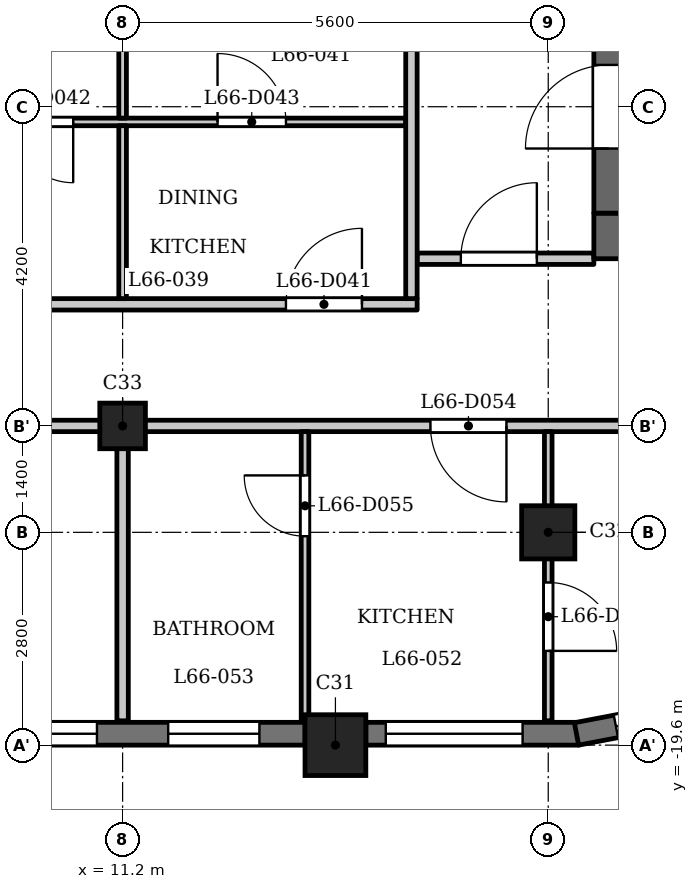
"""IFC4 building model, lengths in metres.
Left out: names, types, materials, properties, quantities, classifications, styles, units other than length and angle.
Written with IfcOpenShell. Run it as: python <this file> out.ifc"""

import sys

from ifc_helpers import new_model, si_unit, direction, frame, frame_2d, origin, origin_2d, place, context, subcontext, project, spatial, rectangle, extrude, element, fill, save


model = new_model("IFC4")
c1 = context("Model", 3, precision=1e-05, world=origin(), true_north=direction((0.0, 1.0)))
c2 = subcontext(c1, "Body", "Model", "MODEL_VIEW")
j1 = project(units=[si_unit("LENGTHUNIT", "METRE"), si_unit("PLANEANGLEUNIT", "RADIAN")], contexts=[c1])
p1 = place(None, origin())
s1 = spatial("IfcSite", under=j1, at=p1, CompositionType="ELEMENT")
p2 = place(p1, origin())
s2 = spatial("IfcBuilding", under=s1, at=p2, CompositionType="ELEMENT")
p3 = place(p2, frame((0.0, 0.0, 255.7)))
s3 = spatial("IfcBuildingStorey", under=s2, at=p3, CompositionType="ELEMENT", Elevation=255.7)
p4 = place(p3, frame((14.0, -19.6, 0.0), z_axis=(0.0, 0.0, 1.0), x_axis=(1.0, 0.0, 0.0)))
e1 = element("IfcColumn", 1, at=p4, inside=s3, PredefinedType="COLUMN", context=c2, shape_type="SweptSolid", body=[
    extrude(rectangle(XDim=0.8, YDim=0.8, at=origin_2d()), origin(), (0.0, 0.0, 1.0), 3.5),
])
p5 = place(p3, frame((16.8, -16.8, 0.0), z_axis=(0.0, 0.0, 1.0), x_axis=(1.0, 0.0, 0.0)))
e2 = element("IfcColumn", 2, at=p5, inside=s3, PredefinedType="COLUMN", context=c2, shape_type="SweptSolid", body=[
    extrude(rectangle(XDim=0.7, YDim=0.7, at=origin_2d()), origin(), (0.0, 0.0, 1.0), 3.5),
])
p6 = place(p3, frame((11.2, -15.4, 0.0), z_axis=(0.0, 0.0, 1.0), x_axis=(1.0, 0.0, 0.0)))
e3 = element("IfcColumn", 3, at=p6, inside=s3, PredefinedType="COLUMN", context=c2, shape_type="SweptSolid", body=[
    extrude(rectangle(XDim=0.6, YDim=0.6, at=origin_2d()), origin(), (0.0, 0.0, 1.0), 3.5),
])
p7 = place(p3, frame((8.8, -19.45, 0.0), z_axis=(0.0, 0.0, 1.0), x_axis=(1.0, 0.0, 0.0)))
e4 = element("IfcWall", 4, at=p7, inside=s3, PredefinedType="SOLIDWALL", context=c2, shape_type="SweptSolid", body=[
    extrude(rectangle(XDim=4.8, YDim=0.3, at=frame_2d((2.4, 0.0))), origin(), (0.0, 0.0, 1.0), 2.55),
])
p8 = place(p7, frame((0.262, 0.0, 0.9)))
e5 = element("IfcOpeningElement", 5, at=p8, cuts=e4, PredefinedType="OPENING", context=c2, shape_type="SweptSolid", body=[
    extrude(rectangle(XDim=1.8, YDim=1.25, at=frame_2d((0.9, 0.625))), frame((0.0, 0.16, 0.0), z_axis=(0.0, -1.0, 0.0), x_axis=(1.0, 0.0, 0.0)), (0.0, 0.0, 1.0), 0.32),
])
p9 = place(p7, frame((3.0, 0.0, 0.6)))
e6 = element("IfcOpeningElement", 6, at=p9, cuts=e4, PredefinedType="OPENING", context=c2, shape_type="SweptSolid", body=[
    extrude(rectangle(XDim=1.2, YDim=1.55, at=frame_2d((0.6, 0.775))), frame((0.0, 0.16, 0.0), z_axis=(0.0, -1.0, 0.0), x_axis=(1.0, 0.0, 0.0)), (0.0, 0.0, 1.0), 0.32),
])
p10 = place(p3, frame((14.4, -19.45, 0.0), z_axis=(0.0, 0.0, 1.0), x_axis=(1.0, 0.0, 0.0)))
e7 = element("IfcWall", 7, at=p10, inside=s3, PredefinedType="SOLIDWALL", context=c2, shape_type="SweptSolid", body=[
    extrude(rectangle(XDim=2.8, YDim=0.3, at=frame_2d((1.4, 0.0))), origin(), (0.0, 0.0, 1.0), 2.55),
])
p11 = place(p10, frame((0.262, 0.0, 0.9)))
e8 = element("IfcOpeningElement", 8, at=p11, cuts=e7, PredefinedType="OPENING", context=c2, shape_type="SweptSolid", body=[
    extrude(rectangle(XDim=1.8, YDim=1.25, at=frame_2d((0.9, 0.625))), frame((0.0, 0.16, 0.0), z_axis=(0.0, -1.0, 0.0), x_axis=(1.0, 0.0, 0.0)), (0.0, 0.0, 1.0), 0.32),
])
p12 = place(p3, frame((17.172, -19.453, 0.0), z_axis=(0.0, 0.0, 1.0), x_axis=(0.982301706131, 0.187305520826, 0.0)))
e9 = element("IfcWall", 9, at=p12, inside=s3, PredefinedType="SOLIDWALL", context=c2, shape_type="SweptSolid", body=[
    extrude(rectangle(XDim=1.856, YDim=0.3, at=frame_2d((0.928, 0.0))), origin(), (0.0, 0.0, 1.0), 2.55),
])
p13 = place(p12, frame((0.528, 0.0, 0.6)))
e10 = element("IfcOpeningElement", 10, at=p13, cuts=e9, PredefinedType="OPENING", context=c2, shape_type="SweptSolid", body=[
    extrude(rectangle(XDim=0.8, YDim=1.55, at=frame_2d((0.4, 0.775))), frame((0.0, 0.16, 0.0), z_axis=(0.0, -1.0, 0.0), x_axis=(1.0, 0.0, 0.0)), (0.0, 0.0, 1.0), 0.32),
])
p14 = place(p3, frame((17.4, -12.9, 0.0), z_axis=(0.0, 0.0, 1.0), x_axis=(1.0, 0.0, 0.0)))
e11 = element("IfcWall", 11, at=p14, inside=s3, PredefinedType="SHEAR", context=c2, shape_type="SweptSolid", body=[
    extrude(rectangle(XDim=7.32, YDim=0.6, at=frame_2d((3.66, 0.0))), origin(), (0.0, 0.0, 1.0), 3.2),
])
p15 = place(p3, frame((17.6, -12.6, 0.0), z_axis=(0.0, 0.0, 1.0), x_axis=(0.0, 1.0, 0.0)))
e12 = element("IfcWall", 12, at=p15, inside=s3, PredefinedType="SHEAR", context=c2, shape_type="SweptSolid", body=[
    extrude(rectangle(XDim=25.2, YDim=0.4, at=frame_2d((12.6, 0.0))), origin(), (0.0, 0.0, 1.0), 3.2),
])
p16 = place(p15, frame((6.3, 0.0, 0.0)))
e13 = element("IfcOpeningElement", 13, at=p16, cuts=e12, PredefinedType="OPENING", context=c2, shape_type="SweptSolid", body=[
    extrude(rectangle(XDim=1.1, YDim=2.1, at=frame_2d((0.55, 1.05))), frame((0.0, 0.21, 0.0), z_axis=(0.0, -1.0, 0.0), x_axis=(1.0, 0.0, 0.0)), (0.0, 0.0, 1.0), 0.42),
])
p17 = place(p15, frame((8.7, 0.0, 0.0)))
e14 = element("IfcOpeningElement", 14, at=p17, cuts=e12, PredefinedType="OPENING", context=c2, shape_type="SweptSolid", body=[
    extrude(rectangle(XDim=1.1, YDim=2.1, at=frame_2d((0.55, 1.05))), frame((0.0, 0.21, 0.0), z_axis=(0.0, -1.0, 0.0), x_axis=(1.0, 0.0, 0.0)), (0.0, 0.0, 1.0), 0.42),
])
p18 = place(p15, frame((11.2, 0.0, 0.0)))
e15 = element("IfcOpeningElement", 15, at=p18, cuts=e12, PredefinedType="OPENING", context=c2, shape_type="SweptSolid", body=[
    extrude(rectangle(XDim=0.9, YDim=2.1, at=frame_2d((0.45, 1.05))), frame((0.0, 0.21, 0.0), z_axis=(0.0, -1.0, 0.0), x_axis=(1.0, 0.0, 0.0)), (0.0, 0.0, 1.0), 0.42),
])
p19 = place(p15, frame((17.05, 0.0, 0.0)))
e16 = element("IfcOpeningElement", 16, at=p19, cuts=e12, PredefinedType="OPENING", context=c2, shape_type="SweptSolid", body=[
    extrude(rectangle(XDim=0.9, YDim=2.1, at=frame_2d((0.45, 1.05))), frame((0.0, 0.21, 0.0), z_axis=(0.0, -1.0, 0.0), x_axis=(1.0, 0.0, 0.0)), (0.0, 0.0, 1.0), 0.42),
])
p20 = place(p15, frame((23.25, 0.0, 0.0)))
e17 = element("IfcOpeningElement", 17, at=p20, cuts=e12, PredefinedType="OPENING", context=c2, shape_type="SweptSolid", body=[
    extrude(rectangle(XDim=1.1, YDim=2.1, at=frame_2d((0.55, 1.05))), frame((0.0, 0.21, 0.0), z_axis=(0.0, -1.0, 0.0), x_axis=(1.0, 0.0, 0.0)), (0.0, 0.0, 1.0), 0.42),
])
p21 = place(p15, frame((0.85, 0.0, 0.0)))
e18 = element("IfcOpeningElement", 18, at=p21, cuts=e12, PredefinedType="OPENING", context=c2, shape_type="SweptSolid", body=[
    extrude(rectangle(XDim=1.1, YDim=2.1, at=frame_2d((0.55, 1.05))), frame((0.0, 0.21, 0.0), z_axis=(0.0, -1.0, 0.0), x_axis=(1.0, 0.0, 0.0)), (0.0, 0.0, 1.0), 0.42),
])
p22 = place(p15, frame((13.075, 0.0, 0.0)))
e19 = element("IfcOpeningElement", 19, at=p22, cuts=e12, PredefinedType="OPENING", context=c2, shape_type="SweptSolid", body=[
    extrude(rectangle(XDim=1.8, YDim=2.1, at=frame_2d((0.9, 1.05))), frame((0.0, 0.21, 0.0), z_axis=(0.0, -1.0, 0.0), x_axis=(1.0, 0.0, 0.0)), (0.0, 0.0, 1.0), 0.42),
])
p23 = place(p3, frame((-23.322, -15.4, 0.0), z_axis=(0.0, 0.0, 1.0), x_axis=(1.0, 0.0, 0.0)))
e20 = element("IfcWall", 20, at=p23, inside=s3, PredefinedType="PARTITIONING", context=c2, shape_type="SweptSolid", body=[
    extrude(rectangle(XDim=46.872, YDim=0.15, at=frame_2d((23.436, 0.0))), origin(), (0.0, 0.0, 1.0), 3.2),
])
p24 = place(p23, frame((7.172, 0.0, 0.0)))
e21 = element("IfcOpeningElement", 21, at=p24, cuts=e20, PredefinedType="OPENING", context=c2, shape_type="SweptSolid", body=[
    extrude(rectangle(XDim=1.0, YDim=2.1, at=frame_2d((0.5, 1.05))), frame((0.0, 0.085, 0.0), z_axis=(0.0, -1.0, 0.0), x_axis=(1.0, 0.0, 0.0)), (0.0, 0.0, 1.0), 0.17),
])
p25 = place(p23, frame((14.922, 0.0, 0.0)))
e22 = element("IfcOpeningElement", 22, at=p25, cuts=e20, PredefinedType="OPENING", context=c2, shape_type="SweptSolid", body=[
    extrude(rectangle(XDim=1.0, YDim=2.1, at=frame_2d((0.5, 1.05))), frame((0.0, 0.085, 0.0), z_axis=(0.0, -1.0, 0.0), x_axis=(1.0, 0.0, 0.0)), (0.0, 0.0, 1.0), 0.17),
])
p26 = place(p23, frame((26.372, 0.0, 0.0)))
e23 = element("IfcOpeningElement", 23, at=p26, cuts=e20, PredefinedType="OPENING", context=c2, shape_type="SweptSolid", body=[
    extrude(rectangle(XDim=1.0, YDim=2.1, at=frame_2d((0.5, 1.05))), frame((0.0, 0.085, 0.0), z_axis=(0.0, -1.0, 0.0), x_axis=(1.0, 0.0, 0.0)), (0.0, 0.0, 1.0), 0.17),
])
p27 = place(p23, frame((38.572, 0.0, 0.0)))
e24 = element("IfcOpeningElement", 24, at=p27, cuts=e20, PredefinedType="OPENING", context=c2, shape_type="SweptSolid", body=[
    extrude(rectangle(XDim=1.0, YDim=2.1, at=frame_2d((0.5, 1.05))), frame((0.0, 0.085, 0.0), z_axis=(0.0, -1.0, 0.0), x_axis=(1.0, 0.0, 0.0)), (0.0, 0.0, 1.0), 0.17),
])
p28 = place(p3, frame((-15.075, -13.8, 0.0), z_axis=(0.0, 0.0, 1.0), x_axis=(1.0, 0.0, 0.0)))
e25 = element("IfcWall", 25, at=p28, inside=s3, PredefinedType="PARTITIONING", context=c2, shape_type="SweptSolid", body=[
    extrude(rectangle(XDim=30.15, YDim=0.15, at=frame_2d((15.075, 0.0))), origin(), (0.0, 0.0, 1.0), 3.2),
])
p29 = place(p28, frame((7.825, 0.0, 0.0)))
e26 = element("IfcOpeningElement", 26, at=p29, cuts=e25, PredefinedType="OPENING", context=c2, shape_type="SweptSolid", body=[
    extrude(rectangle(XDim=1.0, YDim=2.1, at=frame_2d((0.5, 1.05))), frame((0.0, 0.085, 0.0), z_axis=(0.0, -1.0, 0.0), x_axis=(1.0, 0.0, 0.0)), (0.0, 0.0, 1.0), 0.17),
])
p30 = place(p28, frame((11.225, 0.0, 0.0)))
e27 = element("IfcOpeningElement", 27, at=p30, cuts=e25, PredefinedType="OPENING", context=c2, shape_type="SweptSolid", body=[
    extrude(rectangle(XDim=1.0, YDim=2.1, at=frame_2d((0.5, 1.05))), frame((0.0, 0.085, 0.0), z_axis=(0.0, -1.0, 0.0), x_axis=(1.0, 0.0, 0.0)), (0.0, 0.0, 1.0), 0.17),
])
p31 = place(p28, frame((15.575, 0.0, 0.0)))
e28 = element("IfcOpeningElement", 28, at=p31, cuts=e25, PredefinedType="OPENING", context=c2, shape_type="SweptSolid", body=[
    extrude(rectangle(XDim=1.0, YDim=2.1, at=frame_2d((0.5, 1.05))), frame((0.0, 0.085, 0.0), z_axis=(0.0, -1.0, 0.0), x_axis=(1.0, 0.0, 0.0)), (0.0, 0.0, 1.0), 0.17),
])
p32 = place(p28, frame((28.424, 0.0, 0.0)))
e29 = element("IfcOpeningElement", 29, at=p32, cuts=e25, PredefinedType="OPENING", context=c2, shape_type="SweptSolid", body=[
    extrude(rectangle(XDim=1.0, YDim=2.1, at=frame_2d((0.5, 1.05))), frame((0.0, 0.085, 0.0), z_axis=(0.0, -1.0, 0.0), x_axis=(1.0, 0.0, 0.0)), (0.0, 0.0, 1.0), 0.17),
])
p33 = place(p3, frame((15.075, -13.2, 0.0), z_axis=(0.0, 0.0, 1.0), x_axis=(1.0, 0.0, 0.0)))
e30 = element("IfcWall", 30, at=p33, inside=s3, PredefinedType="PARTITIONING", context=c2, shape_type="SweptSolid", body=[
    extrude(rectangle(XDim=2.325, YDim=0.15, at=frame_2d((1.163, 0.0))), origin(), (0.0, 0.0, 1.0), 3.2),
])
p34 = place(p33, frame((0.575, 0.0, 0.0)))
e31 = element("IfcOpeningElement", 31, at=p34, cuts=e30, PredefinedType="OPENING", context=c2, shape_type="SweptSolid", body=[
    extrude(rectangle(XDim=1.0, YDim=2.1, at=frame_2d((0.5, 1.05))), frame((0.0, 0.085, 0.0), z_axis=(0.0, -1.0, 0.0), x_axis=(1.0, 0.0, 0.0)), (0.0, 0.0, 1.0), 0.17),
])
p35 = place(p3, frame((-14.925, -11.4, 0.0), z_axis=(0.0, 0.0, 1.0), x_axis=(1.0, 0.0, 0.0)))
e32 = element("IfcWall", 32, at=p35, inside=s3, PredefinedType="PARTITIONING", context=c2, shape_type="SweptSolid", body=[
    extrude(rectangle(XDim=29.85, YDim=0.1, at=frame_2d((14.925, 0.0))), origin(), (0.0, 0.0, 1.0), 3.2),
])
p36 = place(p35, frame((2.326, 0.0, 0.0)))
e33 = element("IfcOpeningElement", 33, at=p36, cuts=e32, PredefinedType="OPENING", context=c2, shape_type="SweptSolid", body=[
    extrude(rectangle(XDim=0.8, YDim=2.1, at=frame_2d((0.4, 1.05))), frame((0.0, 0.06, 0.0), z_axis=(0.0, -1.0, 0.0), x_axis=(1.0, 0.0, 0.0)), (0.0, 0.0, 1.0), 0.12),
])
p37 = place(p35, frame((6.775, 0.0, 0.0)))
e34 = element("IfcOpeningElement", 34, at=p37, cuts=e32, PredefinedType="OPENING", context=c2, shape_type="SweptSolid", body=[
    extrude(rectangle(XDim=0.9, YDim=2.1, at=frame_2d((0.45, 1.05))), frame((0.0, 0.06, 0.0), z_axis=(0.0, -1.0, 0.0), x_axis=(1.0, 0.0, 0.0)), (0.0, 0.0, 1.0), 0.12),
])
p38 = place(p35, frame((13.375, 0.0, 0.0)))
e35 = element("IfcOpeningElement", 35, at=p38, cuts=e32, PredefinedType="OPENING", context=c2, shape_type="SweptSolid", body=[
    extrude(rectangle(XDim=0.8, YDim=2.1, at=frame_2d((0.4, 1.05))), frame((0.0, 0.06, 0.0), z_axis=(0.0, -1.0, 0.0), x_axis=(1.0, 0.0, 0.0)), (0.0, 0.0, 1.0), 0.12),
])
p39 = place(p35, frame((10.175, 0.0, 0.0)))
e36 = element("IfcOpeningElement", 36, at=p39, cuts=e32, PredefinedType="OPENING", context=c2, shape_type="SweptSolid", body=[
    extrude(rectangle(XDim=0.9, YDim=2.1, at=frame_2d((0.45, 1.05))), frame((0.0, 0.06, 0.0), z_axis=(0.0, -1.0, 0.0), x_axis=(1.0, 0.0, 0.0)), (0.0, 0.0, 1.0), 0.12),
])
p40 = place(p35, frame((18.975, 0.0, 0.0)))
e37 = element("IfcOpeningElement", 37, at=p40, cuts=e32, PredefinedType="OPENING", context=c2, shape_type="SweptSolid", body=[
    extrude(rectangle(XDim=0.8, YDim=2.1, at=frame_2d((0.4, 1.05))), frame((0.0, 0.06, 0.0), z_axis=(0.0, -1.0, 0.0), x_axis=(1.0, 0.0, 0.0)), (0.0, 0.0, 1.0), 0.12),
])
p41 = place(p35, frame((16.525, 0.0, 0.0)))
e38 = element("IfcOpeningElement", 38, at=p41, cuts=e32, PredefinedType="OPENING", context=c2, shape_type="SweptSolid", body=[
    extrude(rectangle(XDim=0.9, YDim=2.1, at=frame_2d((0.45, 1.05))), frame((0.0, 0.06, 0.0), z_axis=(0.0, -1.0, 0.0), x_axis=(1.0, 0.0, 0.0)), (0.0, 0.0, 1.0), 0.12),
])
p42 = place(p35, frame((24.675, 0.0, 0.0)))
e39 = element("IfcOpeningElement", 39, at=p42, cuts=e32, PredefinedType="OPENING", context=c2, shape_type="SweptSolid", body=[
    extrude(rectangle(XDim=0.8, YDim=2.1, at=frame_2d((0.4, 1.05))), frame((0.0, 0.06, 0.0), z_axis=(0.0, -1.0, 0.0), x_axis=(1.0, 0.0, 0.0)), (0.0, 0.0, 1.0), 0.12),
])
p43 = place(p35, frame((27.374, 0.0, 0.0)))
e40 = element("IfcOpeningElement", 40, at=p43, cuts=e32, PredefinedType="OPENING", context=c2, shape_type="SweptSolid", body=[
    extrude(rectangle(XDim=0.9, YDim=2.1, at=frame_2d((0.45, 1.05))), frame((0.0, 0.06, 0.0), z_axis=(0.0, -1.0, 0.0), x_axis=(1.0, 0.0, 0.0)), (0.0, 0.0, 1.0), 0.12),
])
p44 = place(p3, frame((11.2, -13.725, 0.0), z_axis=(0.0, 0.0, 1.0), x_axis=(0.0, 1.0, 0.0)))
e41 = element("IfcWall", 41, at=p44, inside=s3, PredefinedType="PARTITIONING", context=c2, shape_type="SweptSolid", body=[
    extrude(rectangle(XDim=2.275, YDim=0.1, at=frame_2d((1.138, 0.0))), origin(), (0.0, 0.0, 1.0), 3.2),
])
p45 = place(p3, frame((11.2, -11.35, 0.0), z_axis=(0.0, 0.0, 1.0), x_axis=(0.0, 1.0, 0.0)))
e42 = element("IfcWall", 42, at=p45, inside=s3, PredefinedType="PARTITIONING", context=c2, shape_type="SweptSolid", body=[
    extrude(rectangle(XDim=4.03, YDim=0.1, at=frame_2d((2.015, 0.0))), origin(), (0.0, 0.0, 1.0), 3.2),
])
p46 = place(p45, frame((1.43, 0.0, 0.0)))
e43 = element("IfcOpeningElement", 43, at=p46, cuts=e42, PredefinedType="OPENING", context=c2, shape_type="SweptSolid", body=[
    extrude(rectangle(XDim=0.9, YDim=2.1, at=frame_2d((0.45, 1.05))), frame((0.0, 0.06, 0.0), z_axis=(0.0, -1.0, 0.0), x_axis=(1.0, 0.0, 0.0)), (0.0, 0.0, 1.0), 0.12),
])
p47 = place(p3, frame((11.2, -19.28, 0.0), z_axis=(0.0, 0.0, 1.0), x_axis=(0.0, 1.0, 0.0)))
e44 = element("IfcWall", 44, at=p47, inside=s3, PredefinedType="PARTITIONING", context=c2, shape_type="SweptSolid", body=[
    extrude(rectangle(XDim=3.805, YDim=0.15, at=frame_2d((1.902, 0.0))), origin(), (0.0, 0.0, 1.0), 3.2),
])
p48 = place(p3, frame((13.6, -19.28, 0.0), z_axis=(0.0, 0.0, 1.0), x_axis=(0.0, 1.0, 0.0)))
e45 = element("IfcWall", 45, at=p48, inside=s3, PredefinedType="PARTITIONING", context=c2, shape_type="SweptSolid", body=[
    extrude(rectangle(XDim=3.805, YDim=0.1, at=frame_2d((1.902, 0.0))), origin(), (0.0, 0.0, 1.0), 3.2),
])
p49 = place(p48, frame((2.429, 0.0, 0.0)))
e46 = element("IfcOpeningElement", 46, at=p49, cuts=e45, PredefinedType="OPENING", context=c2, shape_type="SweptSolid", body=[
    extrude(rectangle(XDim=0.8, YDim=2.1, at=frame_2d((0.4, 1.05))), frame((0.0, 0.06, 0.0), z_axis=(0.0, -1.0, 0.0), x_axis=(1.0, 0.0, 0.0)), (0.0, 0.0, 1.0), 0.12),
])
p50 = place(p3, frame((15.0, -13.725, 0.0), z_axis=(0.0, 0.0, 1.0), x_axis=(0.0, 1.0, 0.0)))
e47 = element("IfcWall", 47, at=p50, inside=s3, PredefinedType="PARTITIONING", context=c2, shape_type="SweptSolid", body=[
    extrude(rectangle(XDim=6.956, YDim=0.15, at=frame_2d((3.478, 0.0))), origin(), (0.0, 0.0, 1.0), 3.2),
])
p51 = place(p3, frame((16.8, -19.28, 0.0), z_axis=(0.0, 0.0, 1.0), x_axis=(0.0, 1.0, 0.0)))
e48 = element("IfcWall", 48, at=p51, inside=s3, PredefinedType="PARTITIONING", context=c2, shape_type="SweptSolid", body=[
    extrude(rectangle(XDim=3.805, YDim=0.1, at=frame_2d((1.902, 0.0))), origin(), (0.0, 0.0, 1.0), 3.2),
])
p52 = place(p51, frame((0.92, 0.0, 0.0)))
e49 = element("IfcOpeningElement", 49, at=p52, cuts=e48, PredefinedType="OPENING", context=c2, shape_type="SweptSolid", body=[
    extrude(rectangle(XDim=0.9, YDim=2.1, at=frame_2d((0.45, 1.05))), frame((0.0, 0.06, 0.0), z_axis=(0.0, -1.0, 0.0), x_axis=(1.0, 0.0, 0.0)), (0.0, 0.0, 1.0), 0.12),
])
p53 = place(p21, origin())
e50 = element("IfcDoor", 50, at=p53, inside=s3, OperationType="SINGLE_SWING_RIGHT", PredefinedType="DOOR", context=c2, shape_type="SweptSolid", body=[
    extrude(rectangle(XDim=1.1, YDim=2.1, at=frame_2d((0.55, 1.05))), frame((0.0, 0.025, 0.0), z_axis=(0.0, -1.0, 0.0), x_axis=(1.0, 0.0, 0.0)), (0.0, 0.0, 1.0), 0.05),
])
fill(e18, e50)
p54 = place(p34, origin())
e51 = element("IfcDoor", 51, at=p54, inside=s3, OperationType="SINGLE_SWING_LEFT", PredefinedType="DOOR", context=c2, shape_type="SweptSolid", body=[
    extrude(rectangle(XDim=1.0, YDim=2.1, at=frame_2d((0.5, 1.05))), frame((0.0, 0.025, 0.0), z_axis=(0.0, -1.0, 0.0), x_axis=(1.0, 0.0, 0.0)), (0.0, 0.0, 1.0), 0.05),
])
fill(e31, e51)
p55 = place(p32, origin())
e52 = element("IfcDoor", 52, at=p55, inside=s3, OperationType="SINGLE_SWING_LEFT", PredefinedType="DOOR", context=c2, shape_type="SweptSolid", body=[
    extrude(rectangle(XDim=1.0, YDim=2.1, at=frame_2d((0.5, 1.05))), frame((0.0, 0.025, 0.0), z_axis=(0.0, -1.0, 0.0), x_axis=(1.0, 0.0, 0.0)), (0.0, 0.0, 1.0), 0.05),
])
fill(e29, e52)
p56 = place(p42, origin())
e53 = element("IfcDoor", 53, at=p56, inside=s3, OperationType="SINGLE_SWING_RIGHT", PredefinedType="DOOR", context=c2, shape_type="SweptSolid", body=[
    extrude(rectangle(XDim=0.8, YDim=2.1, at=frame_2d((0.4, 1.05))), frame((0.0, 0.025, 0.0), z_axis=(0.0, -1.0, 0.0), x_axis=(1.0, 0.0, 0.0)), (0.0, 0.0, 1.0), 0.05),
])
fill(e39, e53)
p57 = place(p43, origin())
e54 = element("IfcDoor", 54, at=p57, inside=s3, OperationType="SINGLE_SWING_RIGHT", PredefinedType="DOOR", context=c2, shape_type="SweptSolid", body=[
    extrude(rectangle(XDim=0.9, YDim=2.1, at=frame_2d((0.45, 1.05))), frame((0.0, 0.025, 0.0), z_axis=(0.0, -1.0, 0.0), x_axis=(1.0, 0.0, 0.0)), (0.0, 0.0, 1.0), 0.05),
])
fill(e40, e54)
p58 = place(p27, origin())
e55 = element("IfcDoor", 55, at=p58, inside=s3, OperationType="SINGLE_SWING_RIGHT", PredefinedType="DOOR", context=c2, shape_type="SweptSolid", body=[
    extrude(rectangle(XDim=1.0, YDim=2.1, at=frame_2d((0.5, 1.05))), frame((0.0, 0.025, 0.0), z_axis=(0.0, -1.0, 0.0), x_axis=(1.0, 0.0, 0.0)), (0.0, 0.0, 1.0), 0.05),
])
fill(e24, e55)
p59 = place(p49, origin())
e56 = element("IfcDoor", 56, at=p59, inside=s3, OperationType="SINGLE_SWING_LEFT", PredefinedType="DOOR", context=c2, shape_type="SweptSolid", body=[
    extrude(rectangle(XDim=0.8, YDim=2.1, at=frame_2d((0.4, 1.05))), frame((0.0, 0.025, 0.0), z_axis=(0.0, -1.0, 0.0), x_axis=(1.0, 0.0, 0.0)), (0.0, 0.0, 1.0), 0.05),
])
fill(e46, e56)
p60 = place(p52, origin())
e57 = element("IfcDoor", 57, at=p60, inside=s3, OperationType="SINGLE_SWING_LEFT", PredefinedType="DOOR", context=c2, shape_type="SweptSolid", body=[
    extrude(rectangle(XDim=0.9, YDim=2.1, at=frame_2d((0.45, 1.05))), frame((0.0, 0.025, 0.0), z_axis=(0.0, -1.0, 0.0), x_axis=(1.0, 0.0, 0.0)), (0.0, 0.0, 1.0), 0.05),
])
fill(e49, e57)
p61 = place(p8, origin())
e58 = element("IfcWindow", 58, at=p61, inside=s3, PartitioningType="SINGLE_PANEL", PredefinedType="WINDOW", context=c2, shape_type="SweptSolid", body=[
    extrude(rectangle(XDim=1.8, YDim=1.25, at=frame_2d((0.9, 0.625))), frame((0.0, 0.03, 0.0), z_axis=(0.0, -1.0, 0.0), x_axis=(1.0, 0.0, 0.0)), (0.0, 0.0, 1.0), 0.06),
])
fill(e5, e58)
p62 = place(p9, origin())
e59 = element("IfcWindow", 59, at=p62, inside=s3, PartitioningType="SINGLE_PANEL", PredefinedType="WINDOW", context=c2, shape_type="SweptSolid", body=[
    extrude(rectangle(XDim=1.2, YDim=1.55, at=frame_2d((0.6, 0.775))), frame((0.0, 0.03, 0.0), z_axis=(0.0, -1.0, 0.0), x_axis=(1.0, 0.0, 0.0)), (0.0, 0.0, 1.0), 0.06),
])
fill(e6, e59)
p63 = place(p11, origin())
e60 = element("IfcWindow", 60, at=p63, inside=s3, PartitioningType="SINGLE_PANEL", PredefinedType="WINDOW", context=c2, shape_type="SweptSolid", body=[
    extrude(rectangle(XDim=1.8, YDim=1.25, at=frame_2d((0.9, 0.625))), frame((0.0, 0.03, 0.0), z_axis=(0.0, -1.0, 0.0), x_axis=(1.0, 0.0, 0.0)), (0.0, 0.0, 1.0), 0.06),
])
fill(e8, e60)
p64 = place(p13, origin())
e61 = element("IfcWindow", 61, at=p64, inside=s3, PartitioningType="SINGLE_PANEL", PredefinedType="WINDOW", context=c2, shape_type="SweptSolid", body=[
    extrude(rectangle(XDim=0.8, YDim=1.55, at=frame_2d((0.4, 0.775))), frame((0.0, 0.03, 0.0), z_axis=(0.0, -1.0, 0.0), x_axis=(1.0, 0.0, 0.0)), (0.0, 0.0, 1.0), 0.06),
])
fill(e10, e61)
save(model, sys.argv[1])
